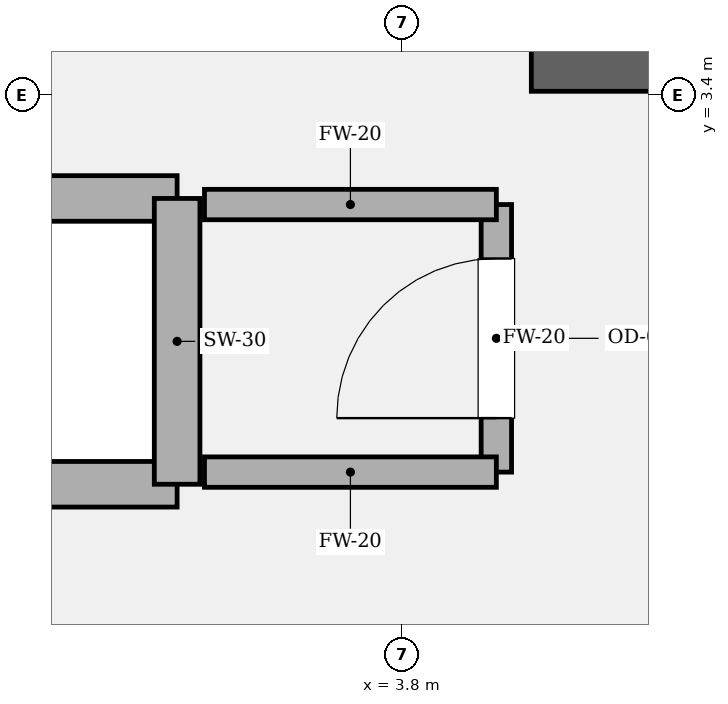
"""IFC4 building model, lengths in metres.
Left out: names, types, materials, properties, quantities, classifications, styles, units other than length and angle.
Written with IfcOpenShell. Run it as: python <this file> out.ifc"""

import sys

from ifc_helpers import new_model, si_unit, direction, frame, frame_2d, origin, place, context, subcontext, project, spatial, rectangle, extrude, element, fill, save


model = new_model("IFC4")
c1 = context("Model", 3, precision=1e-05, world=origin(), true_north=direction((0.0, 1.0)))
c2 = subcontext(c1, "Body", "Model", "MODEL_VIEW")
j1 = project(units=[si_unit("LENGTHUNIT", "METRE"), si_unit("PLANEANGLEUNIT", "RADIAN")], contexts=[c1])
p1 = place(None, origin())
s1 = spatial("IfcSite", under=j1, at=p1, CompositionType="ELEMENT")
p2 = place(p1, origin())
s2 = spatial("IfcBuilding", under=s1, at=p2, CompositionType="ELEMENT")
p3 = place(p2, frame((0.0, 0.0, 251.4)))
s3 = spatial("IfcBuildingStorey", under=s2, at=p3, CompositionType="ELEMENT", Elevation=251.4)
p4 = place(p3, frame((4.65, 3.6, 0.0), z_axis=(0.0, 0.0, 1.0), x_axis=(1.0, 0.0, 0.0)))
e1 = element("IfcWall", 1, at=p4, inside=s3, PredefinedType="SOLIDWALL", context=c2, shape_type="SweptSolid", body=[
    extrude(rectangle(XDim=5.275, YDim=0.35, at=frame_2d((2.638, 0.0))), origin(), (0.0, 0.0, 1.0), 4.05),
])
for number, where, z_axis, x_axis in (
    (2, (-2.32, 0.84, 0.0), (0.0, 0.0, 1.0), (1.0, 0.0, 0.0)),
    (3, (-2.32, 2.72, 0.0), (0.0, 0.0, 1.0), (1.0, 0.0, 0.0)),
):
    element("IfcWall", number, at=place(p3, frame(where, z_axis=z_axis, x_axis=x_axis)), inside=s3, PredefinedType="SOLIDWALL", context=c2, shape_type="SweptSolid", body=[
        extrude(rectangle(XDim=4.64, YDim=0.3, at=frame_2d((2.32, 0.0))), origin(), (0.0, 0.0, 1.0), 3.85),
    ])
p5 = place(p3, frame((2.32, 0.84, 0.0), z_axis=(0.0, 0.0, 1.0), x_axis=(0.0, 1.0, 0.0)))
e4 = element("IfcWall", 4, at=p5, inside=s3, PredefinedType="SOLIDWALL", context=c2, shape_type="SweptSolid", body=[
    extrude(rectangle(XDim=1.88, YDim=0.3, at=frame_2d((0.94, 0.0))), origin(), (0.0, 0.0, 1.0), 3.85),
])
p6 = place(p3, frame((4.42, 0.92, 0.0), z_axis=(0.0, 0.0, 1.0), x_axis=(0.0, 1.0, 0.0)))
e5 = element("IfcWall", 5, at=p6, inside=s3, PredefinedType="SOLIDWALL", context=c2, shape_type="SweptSolid", body=[
    extrude(rectangle(XDim=1.76, YDim=0.2, at=frame_2d((0.88, 0.0))), origin(), (0.0, 0.0, 1.0), 3.85),
])
p7 = place(p6, frame((0.355, 0.0, 0.0)))
e6 = element("IfcOpeningElement", 6, at=p7, cuts=e5, PredefinedType="OPENING", context=c2, shape_type="SweptSolid", body=[
    extrude(rectangle(XDim=1.05, YDim=2.2, at=frame_2d((0.525, 1.1))), frame((0.0, 0.11, 0.0), z_axis=(0.0, -1.0, 0.0), x_axis=(1.0, 0.0, 0.0)), (0.0, 0.0, 1.0), 0.22),
])
for number, where, z_axis, x_axis in (
    (7, (4.42, 2.68, 0.0), (0.0, 0.0, 1.0), (-1.0, 0.0, 0.0)),
    (8, (2.5, 0.92, 0.0), (0.0, 0.0, 1.0), (1.0, 0.0, 0.0)),
):
    element("IfcWall", number, at=place(p3, frame(where, z_axis=z_axis, x_axis=x_axis)), inside=s3, PredefinedType="SOLIDWALL", context=c2, shape_type="SweptSolid", body=[
        extrude(rectangle(XDim=1.92, YDim=0.2, at=frame_2d((0.96, 0.0))), origin(), (0.0, 0.0, 1.0), 3.85),
    ])
p8 = place(p7, origin())
e9 = element("IfcDoor", 9, at=p8, inside=s3, OperationType="SINGLE_SWING_LEFT", PredefinedType="DOOR", context=c2, shape_type="SweptSolid", body=[
    extrude(rectangle(XDim=1.05, YDim=2.2, at=frame_2d((0.525, 1.1))), frame((0.0, 0.025, 0.0), z_axis=(0.0, -1.0, 0.0), x_axis=(1.0, 0.0, 0.0)), (0.0, 0.0, 1.0), 0.05),
])
fill(e6, e9)
save(model, sys.argv[1])
